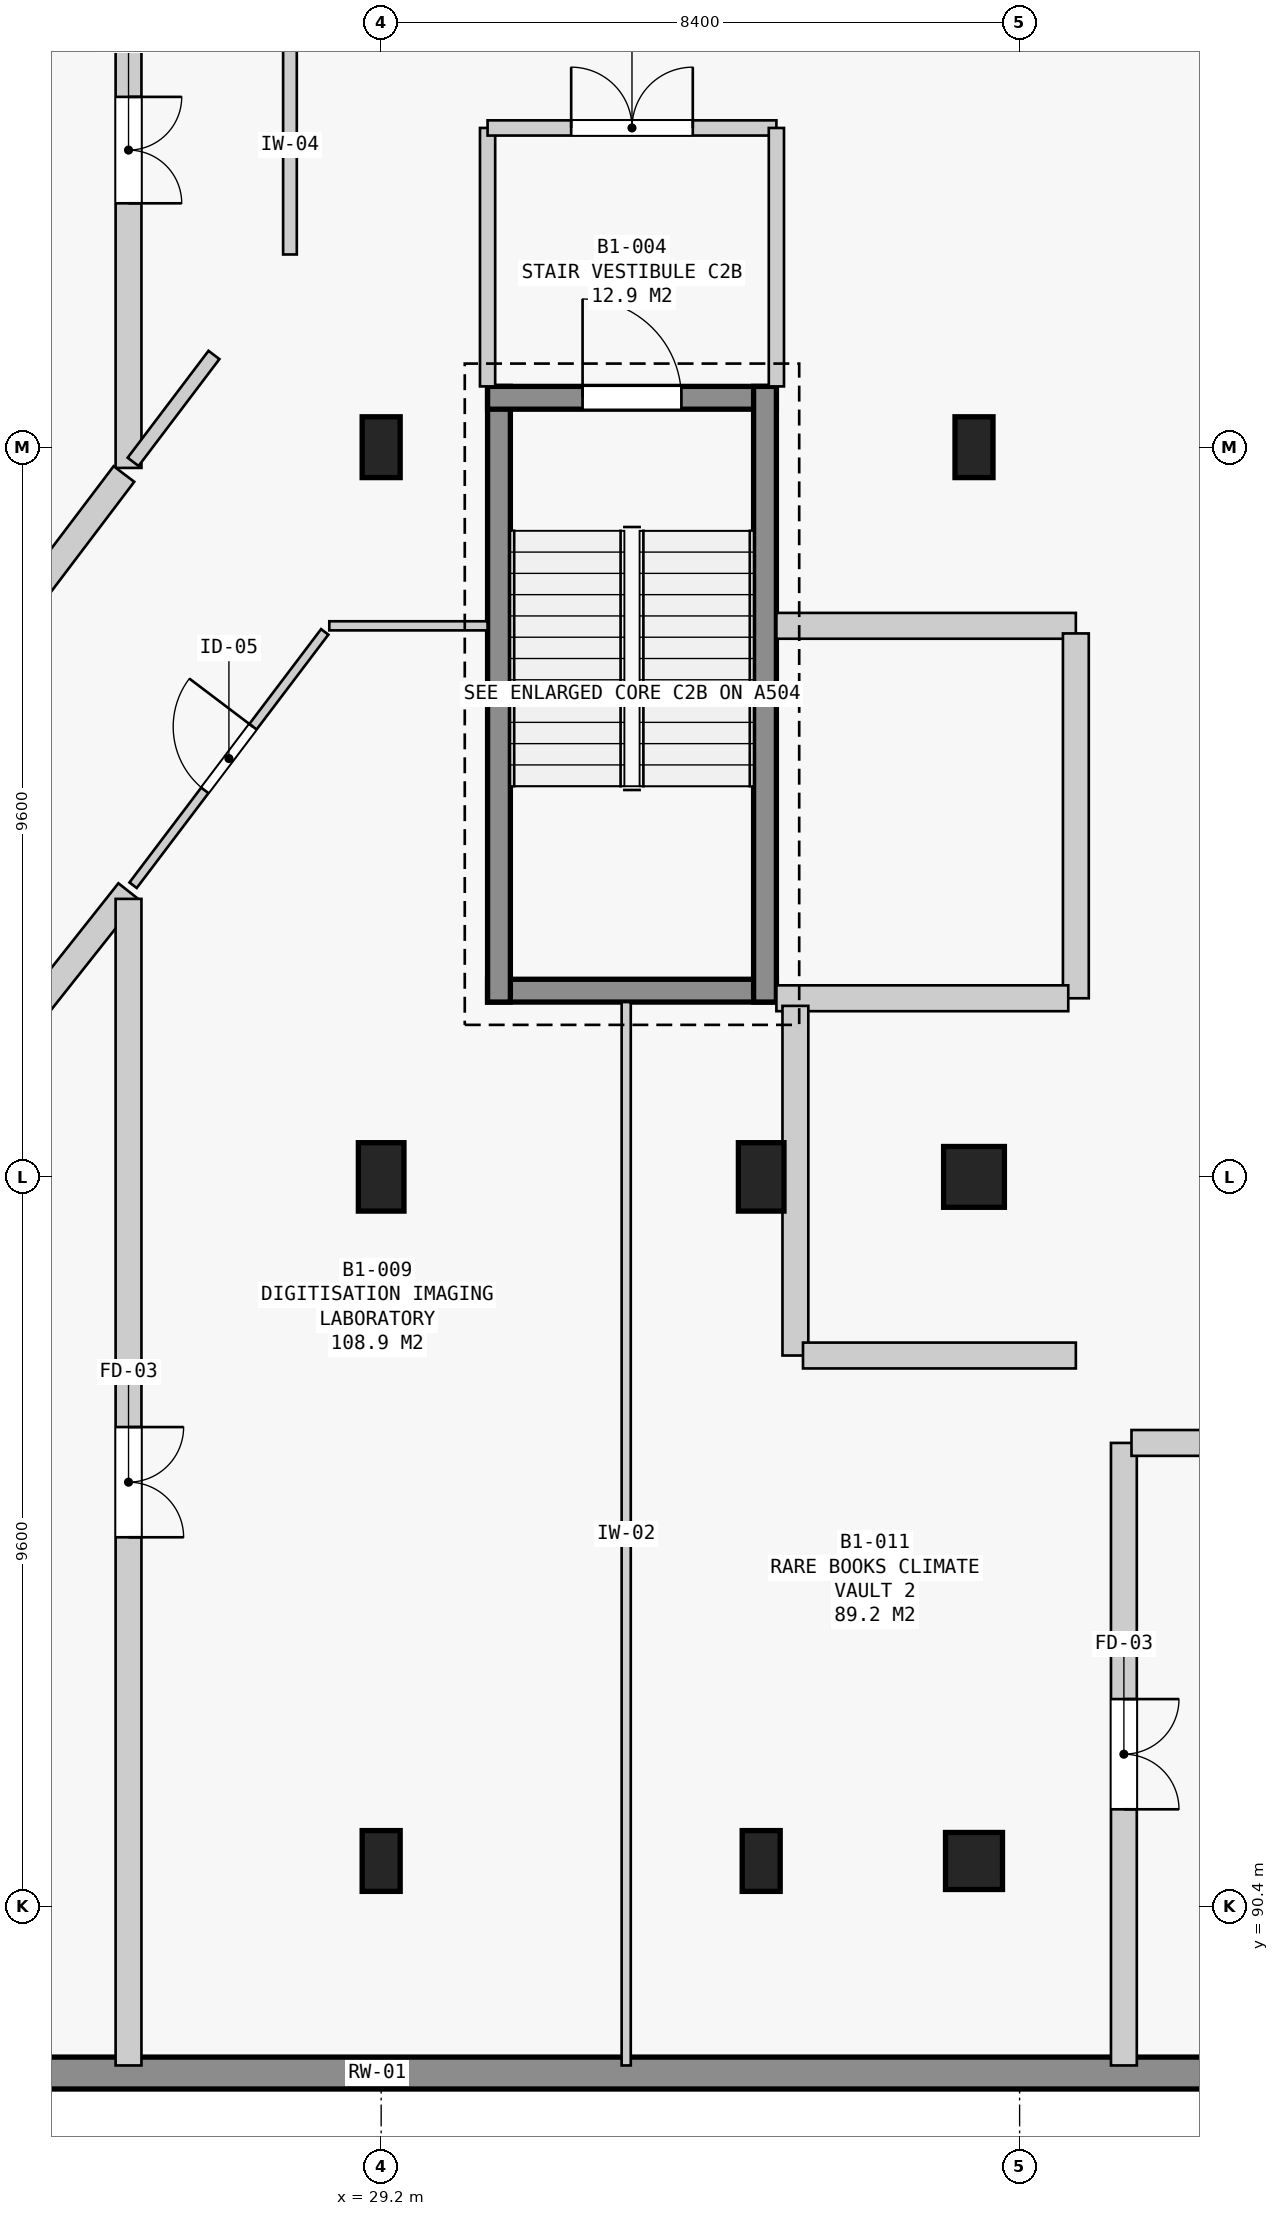
"""IFC4 building model, lengths in metres.
Left out: names, types, materials, properties, quantities, classifications, styles, units other than length and angle.
Written with IfcOpenShell. Run it as: python <this file> out.ifc"""

import sys

from ifc_helpers import new_model, si_unit, direction, frame, frame_2d, origin, origin_2d, place, context, subcontext, project, spatial, rectangle, extrude, element, fill, save


model = new_model("IFC4")
c1 = context("Model", 3, precision=1e-05, world=origin(), true_north=direction((0.0, 1.0)))
c2 = subcontext(c1, "Body", "Model", "MODEL_VIEW")
j1 = project(units=[si_unit("LENGTHUNIT", "METRE"), si_unit("PLANEANGLEUNIT", "RADIAN")], contexts=[c1])
p1 = place(None, origin())
s1 = spatial("IfcSite", under=j1, at=p1, CompositionType="ELEMENT")
p2 = place(p1, origin())
s2 = spatial("IfcBuilding", under=s1, at=p2, CompositionType="ELEMENT")
p3 = place(p2, frame((0.0, 0.0, -4.5)))
s3 = spatial("IfcBuildingStorey", under=s2, at=p3, CompositionType="ELEMENT", Elevation=-4.5)
p4 = place(p3, frame((29.2, 91.0, 0.0), z_axis=(0.0, 0.0, 1.0), x_axis=(1.0, 0.0, 0.0)))
e1 = element("IfcColumn", 1, at=p4, inside=s3, PredefinedType="COLUMN", context=c2, shape_type="SweptSolid", body=[
    extrude(rectangle(XDim=0.5, YDim=0.8, at=origin_2d()), origin(), (0.0, 0.0, 1.0), 4.5),
])
p5 = place(p3, frame((29.2, 100.0, 0.0), z_axis=(0.0, 0.0, 1.0), x_axis=(1.0, 0.0, 0.0)))
e2 = element("IfcColumn", 2, at=p5, inside=s3, PredefinedType="COLUMN", context=c2, shape_type="SweptSolid", body=[
    extrude(rectangle(XDim=0.6, YDim=0.9, at=origin_2d()), origin(), (0.0, 0.0, 1.0), 4.5),
])
for number, where, z_axis, x_axis in (
    (3, (29.2, 109.6, 0.0), (0.0, 0.0, 1.0), (1.0, 0.0, 0.0)),
    (4, (34.2, 91.0, 0.0), (0.0, 0.0, 1.0), (1.0, 0.0, 0.0)),
):
    element("IfcColumn", number, at=place(p3, frame(where, z_axis=z_axis, x_axis=x_axis)), inside=s3, PredefinedType="COLUMN", context=c2, shape_type="SweptSolid", body=[
        extrude(rectangle(XDim=0.5, YDim=0.8, at=origin_2d()), origin(), (0.0, 0.0, 1.0), 4.5),
    ])
p6 = place(p3, frame((34.2, 100.0, 0.0), z_axis=(0.0, 0.0, 1.0), x_axis=(1.0, 0.0, 0.0)))
e5 = element("IfcColumn", 5, at=p6, inside=s3, PredefinedType="COLUMN", context=c2, shape_type="SweptSolid", body=[
    extrude(rectangle(XDim=0.6, YDim=0.9, at=origin_2d()), origin(), (0.0, 0.0, 1.0), 4.5),
])
p7 = place(p3, frame((37.0, 91.0, 0.0), z_axis=(0.0, 0.0, 1.0), x_axis=(1.0, 0.0, 0.0)))
e6 = element("IfcColumn", 6, at=p7, inside=s3, PredefinedType="COLUMN", context=c2, shape_type="SweptSolid", body=[
    extrude(rectangle(XDim=0.75, YDim=0.75, at=origin_2d()), origin(), (0.0, 0.0, 1.0), 4.5),
])
p8 = place(p3, frame((37.0, 100.0, 0.0), z_axis=(0.0, 0.0, 1.0), x_axis=(1.0, 0.0, 0.0)))
e7 = element("IfcColumn", 7, at=p8, inside=s3, PredefinedType="COLUMN", context=c2, shape_type="SweptSolid", body=[
    extrude(rectangle(XDim=0.8, YDim=0.8, at=origin_2d()), origin(), (0.0, 0.0, 1.0), 4.5),
])
p9 = place(p3, frame((37.0, 109.6, 0.0), z_axis=(0.0, 0.0, 1.0), x_axis=(1.0, 0.0, 0.0)))
e8 = element("IfcColumn", 8, at=p9, inside=s3, PredefinedType="COLUMN", context=c2, shape_type="SweptSolid", body=[
    extrude(rectangle(XDim=0.5, YDim=0.8, at=origin_2d()), origin(), (0.0, 0.0, 1.0), 4.5),
])
p10 = place(p3, frame((45.69, 88.21, 0.0), z_axis=(0.0, 0.0, 1.0), x_axis=(-1.0, 0.0, 0.0)))
e9 = element("IfcWall", 9, at=p10, inside=s3, PredefinedType="SOLIDWALL", context=c2, shape_type="SweptSolid", body=[
    extrude(rectangle(XDim=33.08, YDim=0.42, at=frame_2d((16.54, 0.0))), origin(), (0.0, 0.0, 1.0), 4.5),
])
p11 = place(p3, frame((34.4, 102.45, 0.0), z_axis=(0.0, 0.0, 1.0), x_axis=(-1.0, 0.0, 0.0)))
e10 = element("IfcWall", 10, at=p11, inside=s3, PredefinedType="SHEAR", context=c2, shape_type="SweptSolid", body=[
    extrude(rectangle(XDim=3.8, YDim=0.3, at=frame_2d((1.9, 0.0))), origin(), (0.0, 0.0, 1.0), 4.1),
])
p12 = place(p3, frame((30.75, 102.3, 0.0), z_axis=(0.0, 0.0, 1.0), x_axis=(0.0, 1.0, 0.0)))
e11 = element("IfcWall", 11, at=p12, inside=s3, PredefinedType="SHEAR", context=c2, shape_type="SweptSolid", body=[
    extrude(rectangle(XDim=8.1, YDim=0.3, at=frame_2d((4.05, 0.0))), origin(), (0.0, 0.0, 1.0), 4.1),
])
p13 = place(p3, frame((30.6, 110.25, 0.0), z_axis=(0.0, 0.0, 1.0), x_axis=(1.0, 0.0, 0.0)))
e12 = element("IfcWall", 12, at=p13, inside=s3, PredefinedType="SHEAR", context=c2, shape_type="SweptSolid", body=[
    extrude(rectangle(XDim=3.8, YDim=0.3, at=frame_2d((1.9, 0.0))), origin(), (0.0, 0.0, 1.0), 4.1),
])
p14 = place(p13, frame((1.25, 0.0, 0.0)))
e13 = element("IfcOpeningElement", 13, at=p14, cuts=e12, PredefinedType="OPENING", context=c2, shape_type="SweptSolid", body=[
    extrude(rectangle(XDim=1.3, YDim=2.2, at=frame_2d((0.65, 1.1))), frame((0.0, 0.16, 0.0), z_axis=(0.0, -1.0, 0.0), x_axis=(1.0, 0.0, 0.0)), (0.0, 0.0, 1.0), 0.32),
])
p15 = place(p3, frame((34.25, 110.4, 0.0), z_axis=(0.0, 0.0, 1.0), x_axis=(0.0, -1.0, 0.0)))
e14 = element("IfcWall", 14, at=p15, inside=s3, PredefinedType="SHEAR", context=c2, shape_type="SweptSolid", body=[
    extrude(rectangle(XDim=8.1, YDim=0.3, at=frame_2d((4.05, 0.0))), origin(), (0.0, 0.0, 1.0), 4.1),
])
p16 = place(p3, frame((30.6, 110.4, 0.0), z_axis=(0.0, 0.0, 1.0), x_axis=(0.0, 1.0, 0.0)))
e15 = element("IfcWall", 15, at=p16, inside=s3, PredefinedType="STANDARD", context=c2, shape_type="SweptSolid", body=[
    extrude(rectangle(XDim=3.4, YDim=0.2, at=frame_2d((1.7, 0.0))), origin(), (0.0, 0.0, 1.0), 4.1),
])
p17 = place(p3, frame((30.6, 113.8, 0.0), z_axis=(0.0, 0.0, 1.0), x_axis=(1.0, 0.0, 0.0)))
e16 = element("IfcWall", 16, at=p17, inside=s3, PredefinedType="STANDARD", context=c2, shape_type="SweptSolid", body=[
    extrude(rectangle(XDim=3.8, YDim=0.2, at=frame_2d((1.9, 0.0))), origin(), (0.0, 0.0, 1.0), 4.1),
])
p18 = place(p17, frame((1.1, 0.0, 0.0)))
e17 = element("IfcOpeningElement", 17, at=p18, cuts=e16, PredefinedType="OPENING", context=c2, shape_type="SweptSolid", body=[
    extrude(rectangle(XDim=1.6, YDim=2.2, at=frame_2d((0.8, 1.1))), frame((0.0, 0.11, 0.0), z_axis=(0.0, -1.0, 0.0), x_axis=(1.0, 0.0, 0.0)), (0.0, 0.0, 1.0), 0.22),
])
p19 = place(p3, frame((34.4, 113.8, 0.0), z_axis=(0.0, 0.0, 1.0), x_axis=(0.0, -1.0, 0.0)))
e18 = element("IfcWall", 18, at=p19, inside=s3, PredefinedType="STANDARD", context=c2, shape_type="SweptSolid", body=[
    extrude(rectangle(XDim=3.4, YDim=0.2, at=frame_2d((1.7, 0.0))), origin(), (0.0, 0.0, 1.0), 4.1),
])
p20 = place(p3, frame((25.876, 117.69, 0.0), z_axis=(0.0, 0.0, 1.0), x_axis=(0.0, -1.0, 0.0)))
e19 = element("IfcWall", 19, at=p20, inside=s3, PredefinedType="STANDARD", context=c2, shape_type="SweptSolid", body=[
    extrude(rectangle(XDim=8.363, YDim=0.34, at=frame_2d((4.181, 0.0))), origin(), (0.0, 0.0, 1.0), 4.1),
])
p21 = place(p20, frame((3.481, 0.0, 0.0)))
e20 = element("IfcOpeningElement", 20, at=p21, cuts=e19, PredefinedType="OPENING", context=c2, shape_type="SweptSolid", body=[
    extrude(rectangle(XDim=1.4, YDim=2.2, at=frame_2d((0.7, 1.1))), frame((0.0, 0.18, 0.0), z_axis=(0.0, -1.0, 0.0), x_axis=(1.0, 0.0, 0.0)), (0.0, 0.0, 1.0), 0.36),
])
p22 = place(p3, frame((25.816, 109.248, 0.0), z_axis=(0.0, 0.0, 1.0), x_axis=(-0.60326673285, -0.79753949685, 0.0)))
e21 = element("IfcWall", 21, at=p22, inside=s3, PredefinedType="STANDARD", context=c2, shape_type="SweptSolid", body=[
    extrude(rectangle(XDim=9.707, YDim=0.34, at=frame_2d((4.854, 0.0))), origin(), (0.0, 0.0, 1.0), 4.1),
])
p23 = place(p22, frame((4.128, 0.0, 0.0)))
e22 = element("IfcOpeningElement", 22, at=p23, cuts=e21, PredefinedType="OPENING", context=c2, shape_type="SweptSolid", body=[
    extrude(rectangle(XDim=1.45, YDim=2.2, at=frame_2d((0.725, 1.1))), frame((0.0, 0.18, 0.0), z_axis=(0.0, -1.0, 0.0), x_axis=(1.0, 0.0, 0.0)), (0.0, 0.0, 1.0), 0.36),
])
p24 = place(p3, frame((19.39, 95.565, 0.0), z_axis=(0.0, 0.0, 1.0), x_axis=(0.620703542818, 0.784045350687, 0.0)))
e23 = element("IfcWall", 23, at=p24, inside=s3, PredefinedType="STANDARD", context=c2, shape_type="SweptSolid", body=[
    extrude(rectangle(XDim=10.449, YDim=0.34, at=frame_2d((5.225, 0.0))), origin(), (0.0, 0.0, 1.0), 3.23),
])
p25 = place(p3, frame((25.876, 103.658, 0.0), z_axis=(0.0, 0.0, 1.0), x_axis=(0.0, -1.0, 0.0)))
e24 = element("IfcWall", 24, at=p25, inside=s3, PredefinedType="STANDARD", context=c2, shape_type="SweptSolid", body=[
    extrude(rectangle(XDim=15.348, YDim=0.34, at=frame_2d((7.674, 0.0))), origin(), (0.0, 0.0, 1.0), 3.23),
])
p26 = place(p25, frame((6.949, 0.0, 0.0)))
e25 = element("IfcOpeningElement", 25, at=p26, cuts=e24, PredefinedType="OPENING", context=c2, shape_type="SweptSolid", body=[
    extrude(rectangle(XDim=1.45, YDim=2.2, at=frame_2d((0.725, 1.1))), frame((0.0, 0.18, 0.0), z_axis=(0.0, -1.0, 0.0), x_axis=(1.0, 0.0, 0.0)), (0.0, 0.0, 1.0), 0.36),
])
p27 = place(p3, frame((28.518, 107.25, 0.0), z_axis=(0.0, 0.0, 1.0), x_axis=(1.0, 0.0, 0.0)))
e26 = element("IfcWall", 26, at=p27, inside=s3, PredefinedType="PARTITIONING", context=c2, shape_type="SweptSolid", body=[
    extrude(rectangle(XDim=2.083, YDim=0.12, at=frame_2d((1.041, 0.0))), origin(), (0.0, 0.0, 1.0), 3.33),
])
p28 = place(p3, frame((32.424, 102.3, 0.0), z_axis=(0.0, 0.0, 1.0), x_axis=(0.0, -1.0, 0.0)))
e27 = element("IfcWall", 27, at=p28, inside=s3, PredefinedType="PARTITIONING", context=c2, shape_type="SweptSolid", body=[
    extrude(rectangle(XDim=13.99, YDim=0.12, at=frame_2d((6.995, 0.0))), origin(), (0.0, 0.0, 1.0), 3.18),
])
p29 = place(p3, frame((25.936, 103.837, 0.0), z_axis=(0.0, 0.0, 1.0), x_axis=(0.603275989972, 0.797532494588, 0.0)))
e28 = element("IfcWall", 28, at=p29, inside=s3, PredefinedType="PARTITIONING", context=c2, shape_type="SweptSolid", body=[
    extrude(rectangle(XDim=4.179, YDim=0.12, at=frame_2d((2.089, 0.0))), origin(), (0.0, 0.0, 1.0), 4.1),
])
p30 = place(p29, frame((1.564, 0.0, 0.0)))
e29 = element("IfcOpeningElement", 29, at=p30, cuts=e28, PredefinedType="OPENING", context=c2, shape_type="SweptSolid", body=[
    extrude(rectangle(XDim=1.05, YDim=2.15, at=frame_2d((0.525, 1.075))), frame((0.0, 0.07, 0.0), z_axis=(0.0, -1.0, 0.0), x_axis=(1.0, 0.0, 0.0)), (0.0, 0.0, 1.0), 0.14),
])
p31 = place(p3, frame((28.0, 115.025, 0.0), z_axis=(0.0, 0.0, 1.0), x_axis=(0.0, -1.0, 0.0)))
e30 = element("IfcWall", 30, at=p31, inside=s3, PredefinedType="PARTITIONING", context=c2, shape_type="SweptSolid", body=[
    extrude(rectangle(XDim=2.889, YDim=0.18, at=frame_2d((1.445, 0.0))), origin(), (0.0, 0.0, 1.0), 4.1),
])
p32 = place(p3, frame((27.0, 110.813, 0.0), z_axis=(0.0, 0.0, 1.0), x_axis=(-0.603273712598, -0.797534217252, 0.0)))
e31 = element("IfcWall", 31, at=p32, inside=s3, PredefinedType="PARTITIONING", context=c2, shape_type="SweptSolid", body=[
    extrude(rectangle(XDim=1.763, YDim=0.18, at=frame_2d((0.882, 0.0))), origin(), (0.0, 0.0, 1.0), 4.1),
])
p33 = place(p3, frame((34.4, 107.25, 0.0), z_axis=(0.0, 0.0, 1.0), x_axis=(1.0, 0.0, 0.0)))
e32 = element("IfcWall", 32, at=p33, inside=s3, PredefinedType="STANDARD", context=c2, shape_type="SweptSolid", body=[
    extrude(rectangle(XDim=3.94, YDim=0.34, at=frame_2d((1.97, 0.0))), origin(), (0.0, 0.0, 1.0), 3.23),
])
p34 = place(p3, frame((38.34, 107.15, 0.0), z_axis=(0.0, 0.0, 1.0), x_axis=(0.0, -1.0, 0.0)))
e33 = element("IfcWall", 33, at=p34, inside=s3, PredefinedType="STANDARD", context=c2, shape_type="SweptSolid", body=[
    extrude(rectangle(XDim=4.8, YDim=0.34, at=frame_2d((2.4, 0.0))), origin(), (0.0, 0.0, 1.0), 4.1),
])
p35 = place(p3, frame((38.24, 102.35, 0.0), z_axis=(0.0, 0.0, 1.0), x_axis=(-1.0, 0.0, 0.0)))
e34 = element("IfcWall", 34, at=p35, inside=s3, PredefinedType="STANDARD", context=c2, shape_type="SweptSolid", body=[
    extrude(rectangle(XDim=3.84, YDim=0.34, at=frame_2d((1.92, 0.0))), origin(), (0.0, 0.0, 1.0), 3.23),
])
p36 = place(p3, frame((34.65, 102.25, 0.0), z_axis=(0.0, 0.0, 1.0), x_axis=(0.0, -1.0, 0.0)))
e35 = element("IfcWall", 35, at=p36, inside=s3, PredefinedType="STANDARD", context=c2, shape_type="SweptSolid", body=[
    extrude(rectangle(XDim=4.6, YDim=0.34, at=frame_2d((2.3, 0.0))), origin(), (0.0, 0.0, 1.0), 3.38),
])
p37 = place(p3, frame((34.75, 97.65, 0.0), z_axis=(0.0, 0.0, 1.0), x_axis=(1.0, 0.0, 0.0)))
e36 = element("IfcWall", 36, at=p37, inside=s3, PredefinedType="STANDARD", context=c2, shape_type="SweptSolid", body=[
    extrude(rectangle(XDim=3.59, YDim=0.34, at=frame_2d((1.795, 0.0))), origin(), (0.0, 0.0, 1.0), 3.28),
])
p38 = place(p3, frame((38.972, 96.5, 0.0), z_axis=(0.0, 0.0, 1.0), x_axis=(0.0, -1.0, 0.0)))
e37 = element("IfcWall", 37, at=p38, inside=s3, PredefinedType="STANDARD", context=c2, shape_type="SweptSolid", body=[
    extrude(rectangle(XDim=8.19, YDim=0.34, at=frame_2d((4.095, 0.0))), origin(), (0.0, 0.0, 1.0), 3.28),
])
p39 = place(p38, frame((3.37, 0.0, 0.0)))
e38 = element("IfcOpeningElement", 38, at=p39, cuts=e37, PredefinedType="OPENING", context=c2, shape_type="SweptSolid", body=[
    extrude(rectangle(XDim=1.45, YDim=2.2, at=frame_2d((0.725, 1.1))), frame((0.0, 0.18, 0.0), z_axis=(0.0, -1.0, 0.0), x_axis=(1.0, 0.0, 0.0)), (0.0, 0.0, 1.0), 0.36),
])
p40 = place(p3, frame((39.072, 96.5, 0.0), z_axis=(0.0, 0.0, 1.0), x_axis=(1.0, 0.0, 0.0)))
e39 = element("IfcWall", 39, at=p40, inside=s3, PredefinedType="STANDARD", context=c2, shape_type="SweptSolid", body=[
    extrude(rectangle(XDim=2.528, YDim=0.34, at=frame_2d((1.264, 0.0))), origin(), (0.0, 0.0, 1.0), 3.56),
])
p41 = place(p14, origin())
e40 = element("IfcDoor", 40, at=p41, inside=s3, OperationType="SINGLE_SWING_LEFT", PredefinedType="DOOR", context=c2, shape_type="SweptSolid", body=[
    extrude(rectangle(XDim=1.3, YDim=2.2, at=frame_2d((0.65, 1.1))), frame((0.0, 0.025, 0.0), z_axis=(0.0, -1.0, 0.0), x_axis=(1.0, 0.0, 0.0)), (0.0, 0.0, 1.0), 0.05),
])
fill(e13, e40)
p42 = place(p18, origin())
e41 = element("IfcDoor", 41, at=p42, inside=s3, OperationType="DOUBLE_DOOR_SINGLE_SWING", PredefinedType="DOOR", context=c2, shape_type="SweptSolid", body=[
    extrude(rectangle(XDim=1.6, YDim=2.2, at=frame_2d((0.8, 1.1))), frame((0.0, 0.025, 0.0), z_axis=(0.0, -1.0, 0.0), x_axis=(1.0, 0.0, 0.0)), (0.0, 0.0, 1.0), 0.05),
])
fill(e17, e41)
p43 = place(p26, origin())
e42 = element("IfcDoor", 42, at=p43, inside=s3, OperationType="DOUBLE_DOOR_SINGLE_SWING", PredefinedType="DOOR", context=c2, shape_type="SweptSolid", body=[
    extrude(rectangle(XDim=1.45, YDim=2.2, at=frame_2d((0.725, 1.1))), frame((0.0, 0.025, 0.0), z_axis=(0.0, -1.0, 0.0), x_axis=(1.0, 0.0, 0.0)), (0.0, 0.0, 1.0), 0.05),
])
fill(e25, e42)
p44 = place(p30, origin())
e43 = element("IfcDoor", 43, at=p44, inside=s3, OperationType="SINGLE_SWING_RIGHT", PredefinedType="DOOR", context=c2, shape_type="SweptSolid", body=[
    extrude(rectangle(XDim=1.05, YDim=2.15, at=frame_2d((0.525, 1.075))), frame((0.0, 0.025, 0.0), z_axis=(0.0, -1.0, 0.0), x_axis=(1.0, 0.0, 0.0)), (0.0, 0.0, 1.0), 0.05),
])
fill(e29, e43)
p45 = place(p21, origin())
e44 = element("IfcDoor", 44, at=p45, inside=s3, OperationType="DOUBLE_DOOR_SINGLE_SWING", PredefinedType="DOOR", context=c2, shape_type="SweptSolid", body=[
    extrude(rectangle(XDim=1.4, YDim=2.2, at=frame_2d((0.7, 1.1))), frame((0.0, 0.025, 0.0), z_axis=(0.0, -1.0, 0.0), x_axis=(1.0, 0.0, 0.0)), (0.0, 0.0, 1.0), 0.05),
])
fill(e20, e44)
p46 = place(p39, origin())
e45 = element("IfcDoor", 45, at=p46, inside=s3, OperationType="DOUBLE_DOOR_SINGLE_SWING", PredefinedType="DOOR", context=c2, shape_type="SweptSolid", body=[
    extrude(rectangle(XDim=1.45, YDim=2.2, at=frame_2d((0.725, 1.1))), frame((0.0, 0.025, 0.0), z_axis=(0.0, -1.0, 0.0), x_axis=(1.0, 0.0, 0.0)), (0.0, 0.0, 1.0), 0.05),
])
fill(e38, e45)
save(model, sys.argv[1])
